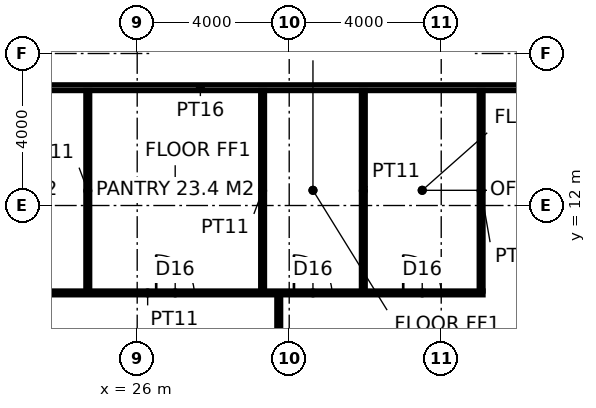
"""IFC4 building model, lengths in metres.
Left out: names, types, materials, properties, quantities, classifications, styles, units other than length and angle.
Written with IfcOpenShell. Run it as: python <this file> out.ifc"""

import sys

from ifc_helpers import new_model, si_unit, direction, frame, frame_2d, origin, place, context, subcontext, project, spatial, rectangle, extrude, element, fill, save


model = new_model("IFC4")
c1 = context("Model", 3, precision=1e-05, world=origin(), true_north=direction((0.0, 1.0)))
c2 = subcontext(c1, "Body", "Model", "MODEL_VIEW")
j1 = project(units=[si_unit("LENGTHUNIT", "METRE"), si_unit("PLANEANGLEUNIT", "RADIAN")], contexts=[c1])
p1 = place(None, origin())
s1 = spatial("IfcSite", under=j1, at=p1, CompositionType="ELEMENT")
p2 = place(p1, origin())
s2 = spatial("IfcBuilding", under=s1, at=p2, CompositionType="ELEMENT")
p3 = place(p2, frame((0.0, 0.0, 167.8)))
s3 = spatial("IfcBuildingStorey", under=s2, at=p3, CompositionType="ELEMENT", Elevation=167.8)
p4 = place(p3, frame((17.5, 15.1, 0.0), z_axis=(0.0, 0.0, 1.0), x_axis=(1.0, 0.0, 0.0)))
e1 = element("IfcWall", 1, at=p4, inside=s3, PredefinedType="PARTITIONING", context=c2, shape_type="SweptSolid", body=[
    extrude(rectangle(XDim=20.325, YDim=0.15, at=frame_2d((10.163, 0.0))), origin(), (0.0, 0.0, 1.0), 3.85),
])
p5 = place(p3, frame((17.45, 9.7, 0.0), z_axis=(0.0, 0.0, 1.0), x_axis=(1.0, 0.0, 0.0)))
e2 = element("IfcWall", 2, at=p5, inside=s3, PredefinedType="PARTITIONING", context=c2, shape_type="SweptSolid", body=[
    extrude(rectangle(XDim=17.65, YDim=0.1, at=frame_2d((8.825, 0.0))), origin(), (0.0, 0.0, 1.0), 3.85),
])
p6 = place(p5, frame((2.75, 0.0, 0.0)))
e3 = element("IfcOpeningElement", 3, at=p6, cuts=e2, PredefinedType="OPENING", context=c2, shape_type="SweptSolid", body=[
    extrude(rectangle(XDim=1.8, YDim=2.4, at=frame_2d((0.9, 1.2))), frame((0.0, 0.06, 0.0), z_axis=(0.0, -1.0, 0.0), x_axis=(1.0, 0.0, 0.0)), (0.0, 0.0, 1.0), 0.12),
])
p7 = place(p5, frame((9.05, 0.0, 0.0)))
e4 = element("IfcOpeningElement", 4, at=p7, cuts=e2, PredefinedType="OPENING", context=c2, shape_type="SweptSolid", body=[
    extrude(rectangle(XDim=1.0, YDim=2.2, at=frame_2d((0.5, 1.1))), frame((0.0, 0.06, 0.0), z_axis=(0.0, -1.0, 0.0), x_axis=(1.0, 0.0, 0.0)), (0.0, 0.0, 1.0), 0.12),
])
p8 = place(p5, frame((12.675, 0.0, 0.0)))
e5 = element("IfcOpeningElement", 5, at=p8, cuts=e2, PredefinedType="OPENING", context=c2, shape_type="SweptSolid", body=[
    extrude(rectangle(XDim=1.0, YDim=2.2, at=frame_2d((0.5, 1.1))), frame((0.0, 0.06, 0.0), z_axis=(0.0, -1.0, 0.0), x_axis=(1.0, 0.0, 0.0)), (0.0, 0.0, 1.0), 0.12),
])
p9 = place(p5, frame((15.55, 0.0, 0.0)))
e6 = element("IfcOpeningElement", 6, at=p9, cuts=e2, PredefinedType="OPENING", context=c2, shape_type="SweptSolid", body=[
    extrude(rectangle(XDim=1.0, YDim=2.2, at=frame_2d((0.5, 1.1))), frame((0.0, 0.06, 0.0), z_axis=(0.0, -1.0, 0.0), x_axis=(1.0, 0.0, 0.0)), (0.0, 0.0, 1.0), 0.12),
])
for number, where, z_axis, x_axis in (
    (7, (24.7, 9.75, 0.0), (0.0, 0.0, 1.0), (0.0, 1.0, 0.0)),
    (8, (29.3, 9.75, 0.0), (0.0, 0.0, 1.0), (0.0, 1.0, 0.0)),
    (9, (31.95, 9.75, 0.0), (0.0, 0.0, 1.0), (0.0, 1.0, 0.0)),
    (10, (35.05, 9.75, 0.0), (0.0, 0.0, 1.0), (0.0, 1.0, 0.0)),
):
    element("IfcWall", number, at=place(p3, frame(where, z_axis=z_axis, x_axis=x_axis)), inside=s3, PredefinedType="PARTITIONING", context=c2, shape_type="SweptSolid", body=[
        extrude(rectangle(XDim=5.275, YDim=0.1, at=frame_2d((2.637, 0.0))), origin(), (0.0, 0.0, 1.0), 3.85),
    ])
p10 = place(p3, frame((29.725, 9.65, 0.0), z_axis=(0.0, 0.0, 1.0), x_axis=(0.0, -1.0, 0.0)))
e11 = element("IfcWall", 11, at=p10, inside=s3, PredefinedType="PARTITIONING", context=c2, shape_type="SweptSolid", body=[
    extrude(rectangle(XDim=5.35, YDim=0.1, at=frame_2d((2.675, 0.0))), origin(), (0.0, 0.0, 1.0), 2.65),
])
p11 = place(p7, origin())
e12 = element("IfcDoor", 12, at=p11, inside=s3, OperationType="SINGLE_SWING_LEFT", PredefinedType="DOOR", context=c2, shape_type="SweptSolid", body=[
    extrude(rectangle(XDim=1.0, YDim=2.2, at=frame_2d((0.5, 1.1))), frame((0.0, 0.025, 0.0), z_axis=(0.0, -1.0, 0.0), x_axis=(1.0, 0.0, 0.0)), (0.0, 0.0, 1.0), 0.05),
])
fill(e4, e12)
p12 = place(p8, origin())
e13 = element("IfcDoor", 13, at=p12, inside=s3, OperationType="SINGLE_SWING_LEFT", PredefinedType="DOOR", context=c2, shape_type="SweptSolid", body=[
    extrude(rectangle(XDim=1.0, YDim=2.2, at=frame_2d((0.5, 1.1))), frame((0.0, 0.025, 0.0), z_axis=(0.0, -1.0, 0.0), x_axis=(1.0, 0.0, 0.0)), (0.0, 0.0, 1.0), 0.05),
])
fill(e5, e13)
p13 = place(p9, origin())
e14 = element("IfcDoor", 14, at=p13, inside=s3, OperationType="SINGLE_SWING_LEFT", PredefinedType="DOOR", context=c2, shape_type="SweptSolid", body=[
    extrude(rectangle(XDim=1.0, YDim=2.2, at=frame_2d((0.5, 1.1))), frame((0.0, 0.025, 0.0), z_axis=(0.0, -1.0, 0.0), x_axis=(1.0, 0.0, 0.0)), (0.0, 0.0, 1.0), 0.05),
])
fill(e6, e14)
save(model, sys.argv[1])
